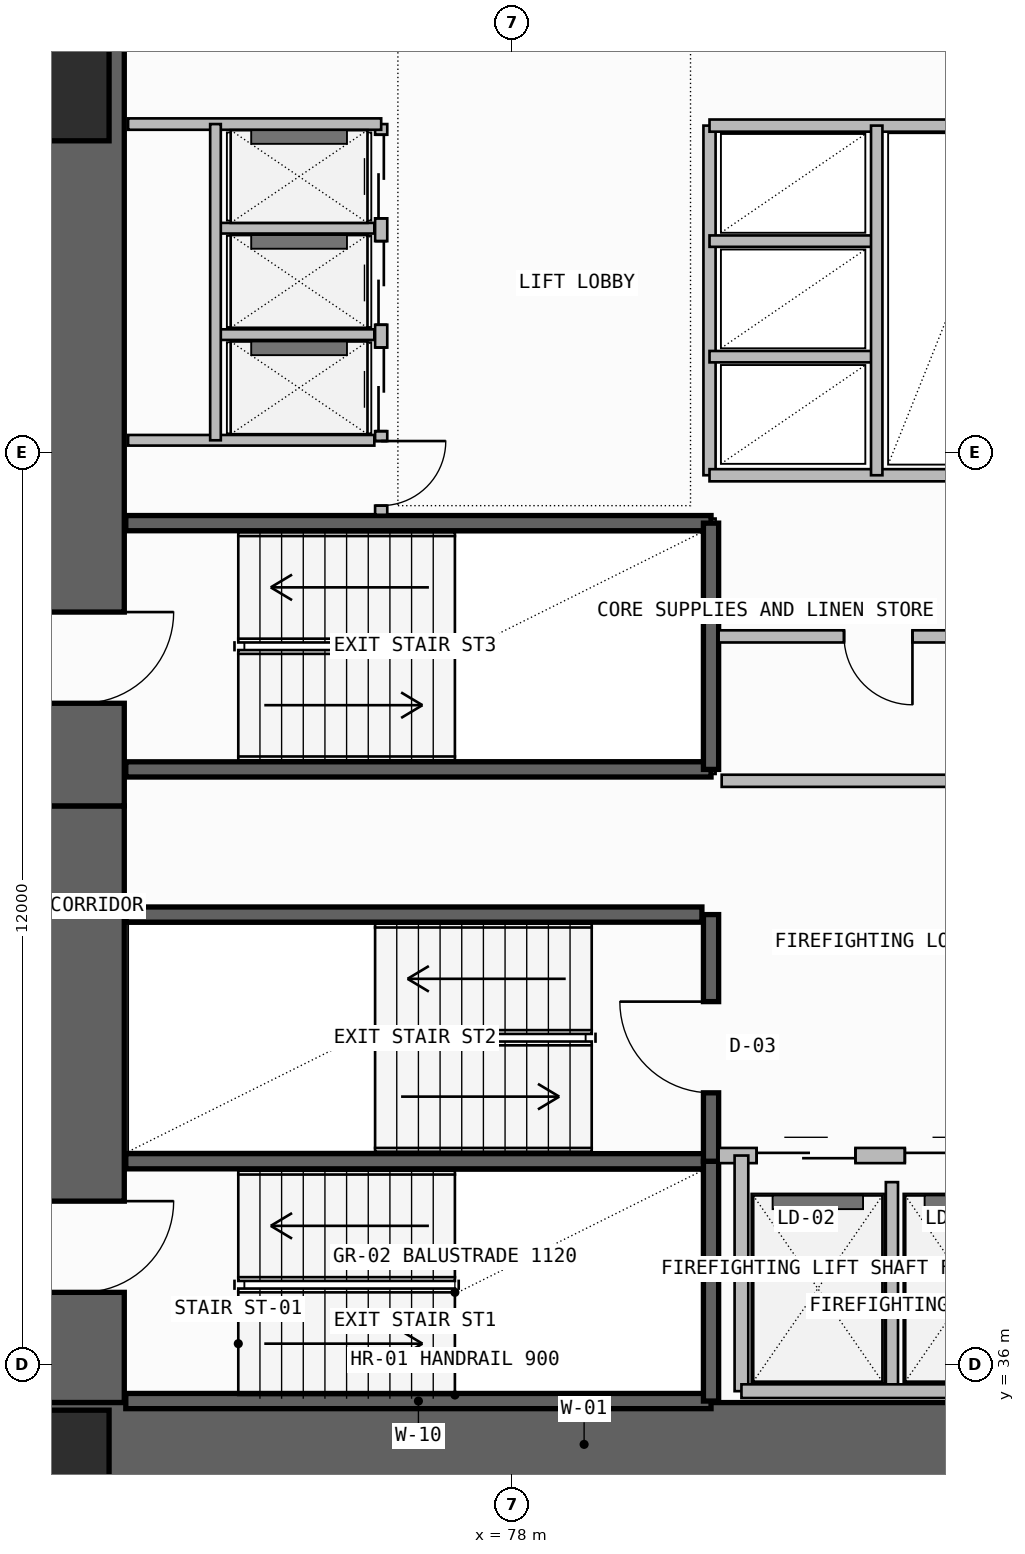
"""IFC4 building model, lengths in metres.
Left out: names, types, materials, properties, quantities, classifications, styles, units other than length and angle.
Written with IfcOpenShell. Run it as: python <this file> out.ifc"""

import sys

from ifc_helpers import new_model, si_unit, direction, frame, frame_2d, origin, origin_2d, place, context, subcontext, project, spatial, rectangle, extrude, element, fill, save


model = new_model("IFC4")
c1 = context("Model", 3, precision=1e-05, world=origin(), true_north=direction((0.0, 1.0)))
c2 = subcontext(c1, "Body", "Model", "MODEL_VIEW")
j1 = project(units=[si_unit("LENGTHUNIT", "METRE"), si_unit("PLANEANGLEUNIT", "RADIAN")], contexts=[c1])
p1 = place(None, origin())
s1 = spatial("IfcSite", under=j1, at=p1, CompositionType="ELEMENT")
p2 = place(p1, origin())
s2 = spatial("IfcBuilding", under=s1, at=p2, CompositionType="ELEMENT")
p3 = place(p2, frame((0.0, 0.0, 70.5)))
s3 = spatial("IfcBuildingStorey", under=s2, at=p3, CompositionType="ELEMENT", Elevation=70.5)
p4 = place(p3, frame((72.35, 35.5, -0.26), z_axis=(0.0, 0.0, 1.0), x_axis=(0.0, 1.0, 0.0)))
e1 = element("IfcWall", 1, at=p4, inside=s3, PredefinedType="SHEAR", context=c2, shape_type="SweptSolid", body=[
    extrude(rectangle(XDim=7.85, YDim=1.1, at=frame_2d((3.925, 0.0))), origin(), (0.0, 0.0, 1.0), 3.6),
])
p5 = place(p4, frame((1.45, 0.0, 0.26)))
e2 = element("IfcOpeningElement", 2, at=p5, cuts=e1, PredefinedType="OPENING", context=c2, shape_type="SweptSolid", body=[
    extrude(rectangle(XDim=1.2, YDim=2.2, at=frame_2d((0.6, 1.1))), frame((0.0, 0.56, 0.0), z_axis=(0.0, -1.0, 0.0), x_axis=(1.0, 0.0, 0.0)), (0.0, 0.0, 1.0), 1.12),
])
p6 = place(p3, frame((71.8, 34.95, -0.26), z_axis=(0.0, 0.0, 1.0), x_axis=(1.0, 0.0, 0.0)))
e3 = element("IfcWall", 3, at=p6, inside=s3, PredefinedType="SHEAR", context=c2, shape_type="SweptSolid", body=[
    extrude(rectangle(XDim=14.3, YDim=1.1, at=frame_2d((7.15, 0.0))), origin(), (0.0, 0.0, 1.0), 3.6),
])
p7 = place(p3, frame((72.35, 43.35, -0.26), z_axis=(0.0, 0.0, 1.0), x_axis=(0.0, 1.0, 0.0)))
e4 = element("IfcWall", 4, at=p7, inside=s3, PredefinedType="SHEAR", context=c2, shape_type="SweptSolid", body=[
    extrude(rectangle(XDim=12.7, YDim=1.1, at=frame_2d((6.35, 0.0))), origin(), (0.0, 0.0, 1.0), 3.6),
])
p8 = place(p7, frame((1.35, 0.0, 0.26)))
e5 = element("IfcOpeningElement", 5, at=p8, cuts=e4, PredefinedType="OPENING", context=c2, shape_type="SweptSolid", body=[
    extrude(rectangle(XDim=1.2, YDim=2.2, at=frame_2d((0.6, 1.1))), frame((0.0, 0.56, 0.0), z_axis=(0.0, -1.0, 0.0), x_axis=(1.0, 0.0, 0.0)), (0.0, 0.0, 1.0), 1.12),
])
for number, where, z_axis, x_axis in (
    (6, (72.0, 34.7, 0.0), (0.0, 0.0, 1.0), (1.0, 0.0, 0.0)),
    (7, (72.0, 52.8, 0.0), (0.0, 0.0, 1.0), (1.0, 0.0, 0.0)),
):
    element("IfcColumn", number, at=place(p3, frame(where, z_axis=z_axis, x_axis=x_axis)), inside=s3, PredefinedType="COLUMN", context=c2, shape_type="SweptSolid", body=[
        extrude(rectangle(XDim=1.4, YDim=1.4, at=origin_2d()), origin(), (0.0, 0.0, 1.0), 3.6),
    ])
for number, where, z_axis, x_axis in (
    (8, (72.92, 35.52, -0.26), (0.0, 0.0, 1.0), (1.0, 0.0, 0.0)),
    (9, (72.92, 38.675, -0.26), (0.0, 0.0, 1.0), (1.0, 0.0, 0.0)),
):
    element("IfcWall", number, at=place(p3, frame(where, z_axis=z_axis, x_axis=x_axis)), inside=s3, PredefinedType="SOLIDWALL", context=c2, shape_type="SweptSolid", body=[
        extrude(rectangle(XDim=7.7, YDim=0.2, at=frame_2d((3.85, 0.0))), origin(), (0.0, 0.0, 1.0), 3.6),
    ])
p9 = place(p3, frame((80.62, 35.52, -0.26), z_axis=(0.0, 0.0, 1.0), x_axis=(0.0, 1.0, 0.0)))
e10 = element("IfcWall", 10, at=p9, inside=s3, PredefinedType="SOLIDWALL", context=c2, shape_type="SweptSolid", body=[
    extrude(rectangle(XDim=3.155, YDim=0.2, at=frame_2d((1.578, 0.0))), origin(), (0.0, 0.0, 1.0), 3.6),
])
p10 = place(p3, frame((80.62, 38.675, -0.26), z_axis=(0.0, 0.0, 1.0), x_axis=(0.0, 1.0, 0.0)))
e11 = element("IfcWall", 11, at=p10, inside=s3, PredefinedType="SOLIDWALL", context=c2, shape_type="SweptSolid", body=[
    extrude(rectangle(XDim=3.245, YDim=0.2, at=frame_2d((1.623, 0.0))), origin(), (0.0, 0.0, 1.0), 3.6),
])
p11 = place(p10, frame((0.9, 0.0, 0.26)))
e12 = element("IfcOpeningElement", 12, at=p11, cuts=e11, PredefinedType="OPENING", context=c2, shape_type="SweptSolid", body=[
    extrude(rectangle(XDim=1.2, YDim=2.2, at=frame_2d((0.6, 1.1))), frame((0.0, 0.11, 0.0), z_axis=(0.0, -1.0, 0.0), x_axis=(1.0, 0.0, 0.0)), (0.0, 0.0, 1.0), 0.22),
])
p12 = place(p3, frame((80.72, 38.75, 0.0), z_axis=(0.0, 0.0, 1.0), x_axis=(1.0, 0.0, 0.0)))
e13 = element("IfcWall", 13, at=p12, inside=s3, PredefinedType="SOLIDWALL", context=c2, shape_type="SweptSolid", body=[
    extrude(rectangle(XDim=4.26, YDim=0.2, at=frame_2d((2.13, 0.0))), origin(), (0.0, 0.0, 1.0), 3.34),
])
p13 = place(p12, frame((0.5, 0.0, 0.0)))
e14 = element("IfcOpeningElement", 14, at=p13, cuts=e13, PredefinedType="OPENING", context=c2, shape_type="SweptSolid", body=[
    extrude(rectangle(XDim=1.3, YDim=2.3, at=frame_2d((0.65, 1.15))), frame((0.0, 0.11, 0.0), z_axis=(0.0, -1.0, 0.0), x_axis=(1.0, 0.0, 0.0)), (0.0, 0.0, 1.0), 0.22),
])
p14 = place(p12, frame((2.45, 0.0, 0.0)))
e15 = element("IfcOpeningElement", 15, at=p14, cuts=e13, PredefinedType="OPENING", context=c2, shape_type="SweptSolid", body=[
    extrude(rectangle(XDim=1.3, YDim=2.3, at=frame_2d((0.65, 1.15))), frame((0.0, 0.11, 0.0), z_axis=(0.0, -1.0, 0.0), x_axis=(1.0, 0.0, 0.0)), (0.0, 0.0, 1.0), 0.22),
])
p15 = place(p3, frame((83.0, 35.65, 0.0), z_axis=(0.0, 0.0, 1.0), x_axis=(0.0, 1.0, 0.0)))
e16 = element("IfcWall", 16, at=p15, inside=s3, PredefinedType="PLUMBINGWALL", context=c2, shape_type="SweptSolid", body=[
    extrude(rectangle(XDim=2.75, YDim=0.16, at=frame_2d((1.375, 0.0))), origin(), (0.0, 0.0, 1.0), 3.34),
])
p16 = place(p3, frame((81.02, 35.65, 0.0), z_axis=(0.0, 0.0, 1.0), x_axis=(0.0, 1.0, 0.0)))
e17 = element("IfcWall", 17, at=p16, inside=s3, PredefinedType="SOLIDWALL", context=c2, shape_type="SweptSolid", body=[
    extrude(rectangle(XDim=3.1, YDim=0.18, at=frame_2d((1.55, 0.0))), origin(), (0.0, 0.0, 1.0), 3.34),
])
p17 = place(p3, frame((81.02, 35.65, 0.0), z_axis=(0.0, 0.0, 1.0), x_axis=(1.0, 0.0, 0.0)))
e18 = element("IfcWall", 18, at=p17, inside=s3, PredefinedType="SOLIDWALL", context=c2, shape_type="SweptSolid", body=[
    extrude(rectangle(XDim=3.93, YDim=0.18, at=frame_2d((1.965, 0.0))), origin(), (0.0, 0.0, 1.0), 3.34),
])
p18 = place(p3, frame((72.92, 41.92, -0.26), z_axis=(0.0, 0.0, 1.0), x_axis=(1.0, 0.0, 0.0)))
e19 = element("IfcWall", 19, at=p18, inside=s3, PredefinedType="SOLIDWALL", context=c2, shape_type="SweptSolid", body=[
    extrude(rectangle(XDim=7.58, YDim=0.2, at=frame_2d((3.79, 0.0))), origin(), (0.0, 0.0, 1.0), 3.6),
])
for number, where, z_axis, x_axis in (
    (20, (72.92, 43.83, -0.26), (0.0, 0.0, 1.0), (1.0, 0.0, 0.0)),
    (21, (72.92, 47.07, -0.26), (0.0, 0.0, 1.0), (1.0, 0.0, 0.0)),
):
    element("IfcWall", number, at=place(p3, frame(where, z_axis=z_axis, x_axis=x_axis)), inside=s3, PredefinedType="SOLIDWALL", context=c2, shape_type="SweptSolid", body=[
        extrude(rectangle(XDim=7.7, YDim=0.2, at=frame_2d((3.85, 0.0))), origin(), (0.0, 0.0, 1.0), 3.6),
    ])
p19 = place(p3, frame((80.62, 43.83, -0.26), z_axis=(0.0, 0.0, 1.0), x_axis=(0.0, 1.0, 0.0)))
e22 = element("IfcWall", 22, at=p19, inside=s3, PredefinedType="SOLIDWALL", context=c2, shape_type="SweptSolid", body=[
    extrude(rectangle(XDim=3.24, YDim=0.2, at=frame_2d((1.62, 0.0))), origin(), (0.0, 0.0, 1.0), 3.6),
])
p20 = place(p3, frame((80.72, 45.58, 0.0), z_axis=(0.0, 0.0, 1.0), x_axis=(1.0, 0.0, 0.0)))
e23 = element("IfcWall", 23, at=p20, inside=s3, PredefinedType="PLUMBINGWALL", context=c2, shape_type="SweptSolid", body=[
    extrude(rectangle(XDim=4.23, YDim=0.16, at=frame_2d((2.115, 0.0))), origin(), (0.0, 0.0, 1.0), 3.34),
])
p21 = place(p20, frame((1.65, 0.0, 0.0)))
e24 = element("IfcOpeningElement", 24, at=p21, cuts=e23, PredefinedType="OPENING", context=c2, shape_type="SweptSolid", body=[
    extrude(rectangle(XDim=0.9, YDim=2.1, at=frame_2d((0.45, 1.05))), frame((0.0, 0.09, 0.0), z_axis=(0.0, -1.0, 0.0), x_axis=(1.0, 0.0, 0.0)), (0.0, 0.0, 1.0), 0.18),
])
p22 = place(p3, frame((80.76, 43.68, 0.0), z_axis=(0.0, 0.0, 1.0), x_axis=(1.0, 0.0, 0.0)))
e25 = element("IfcWall", 25, at=p22, inside=s3, PredefinedType="PLUMBINGWALL", context=c2, shape_type="SweptSolid", body=[
    extrude(rectangle(XDim=4.19, YDim=0.16, at=frame_2d((2.095, 0.0))), origin(), (0.0, 0.0, 1.0), 3.34),
])
p23 = place(p3, frame((76.28, 47.18, 0.0), z_axis=(0.0, 0.0, 1.0), x_axis=(0.0, 1.0, 0.0)))
e26 = element("IfcWall", 26, at=p23, inside=s3, PredefinedType="SOLIDWALL", context=c2, shape_type="SweptSolid", body=[
    extrude(rectangle(XDim=5.14, YDim=0.16, at=frame_2d((2.57, 0.0))), origin(), (0.0, 0.0, 1.0), 3.34),
])
p24 = place(p23, frame((1.1, 0.0, 0.0)))
e27 = element("IfcOpeningElement", 27, at=p24, cuts=e26, PredefinedType="OPENING", context=c2, shape_type="SweptSolid", body=[
    extrude(rectangle(XDim=1.1, YDim=2.25, at=frame_2d((0.55, 1.125))), frame((0.0, 0.09, 0.0), z_axis=(0.0, -1.0, 0.0), x_axis=(1.0, 0.0, 0.0)), (0.0, 0.0, 1.0), 0.18),
])
p25 = place(p23, frame((2.5, 0.0, 0.0)))
e28 = element("IfcOpeningElement", 28, at=p25, cuts=e26, PredefinedType="OPENING", context=c2, shape_type="SweptSolid", body=[
    extrude(rectangle(XDim=1.1, YDim=2.25, at=frame_2d((0.55, 1.125))), frame((0.0, 0.09, 0.0), z_axis=(0.0, -1.0, 0.0), x_axis=(1.0, 0.0, 0.0)), (0.0, 0.0, 1.0), 0.18),
])
p26 = place(p23, frame((3.9, 0.0, 0.0)))
e29 = element("IfcOpeningElement", 29, at=p26, cuts=e26, PredefinedType="OPENING", context=c2, shape_type="SweptSolid", body=[
    extrude(rectangle(XDim=1.1, YDim=2.25, at=frame_2d((0.55, 1.125))), frame((0.0, 0.09, 0.0), z_axis=(0.0, -1.0, 0.0), x_axis=(1.0, 0.0, 0.0)), (0.0, 0.0, 1.0), 0.18),
])
p27 = place(p23, frame((0.12, 0.0, 0.0)))
e30 = element("IfcOpeningElement", 30, at=p27, cuts=e26, PredefinedType="OPENING", context=c2, shape_type="SweptSolid", body=[
    extrude(rectangle(XDim=0.85, YDim=2.05, at=frame_2d((0.425, 1.025))), frame((0.0, 0.09, 0.0), z_axis=(0.0, -1.0, 0.0), x_axis=(1.0, 0.0, 0.0)), (0.0, 0.0, 1.0), 0.18),
])
p28 = place(p3, frame((72.95, 52.32, 0.0), z_axis=(0.0, 0.0, 1.0), x_axis=(1.0, 0.0, 0.0)))
e31 = element("IfcWall", 31, at=p28, inside=s3, PredefinedType="SOLIDWALL", context=c2, shape_type="SweptSolid", body=[
    extrude(rectangle(XDim=3.33, YDim=0.15, at=frame_2d((1.665, 0.0))), origin(), (0.0, 0.0, 1.0), 3.34),
])
p29 = place(p3, frame((72.95, 48.16, 0.0), z_axis=(0.0, 0.0, 1.0), x_axis=(1.0, 0.0, 0.0)))
e32 = element("IfcWall", 32, at=p29, inside=s3, PredefinedType="PLUMBINGWALL", context=c2, shape_type="SweptSolid", body=[
    extrude(rectangle(XDim=3.24, YDim=0.14, at=frame_2d((1.62, 0.0))), origin(), (0.0, 0.0, 1.0), 3.34),
])
for number, where, z_axis, x_axis in (
    (33, (74.15, 49.55, 0.0), (0.0, 0.0, 1.0), (1.0, 0.0, 0.0)),
    (34, (74.15, 50.95, 0.0), (0.0, 0.0, 1.0), (1.0, 0.0, 0.0)),
):
    element("IfcWall", number, at=place(p3, frame(where, z_axis=z_axis, x_axis=x_axis)), inside=s3, PredefinedType="PLUMBINGWALL", context=c2, shape_type="SweptSolid", body=[
        extrude(rectangle(XDim=2.04, YDim=0.14, at=frame_2d((1.02, 0.0))), origin(), (0.0, 0.0, 1.0), 3.34),
    ])
p30 = place(p3, frame((74.1, 48.16, 0.0), z_axis=(0.0, 0.0, 1.0), x_axis=(0.0, 1.0, 0.0)))
e35 = element("IfcWall", 35, at=p30, inside=s3, PredefinedType="PLUMBINGWALL", context=c2, shape_type="SweptSolid", body=[
    extrude(rectangle(XDim=4.16, YDim=0.14, at=frame_2d((2.08, 0.0))), origin(), (0.0, 0.0, 1.0), 3.34),
])
p31 = place(p3, frame((80.6, 47.7, 0.0), z_axis=(0.0, 0.0, 1.0), x_axis=(0.0, 1.0, 0.0)))
e36 = element("IfcWall", 36, at=p31, inside=s3, PredefinedType="SOLIDWALL", context=c2, shape_type="SweptSolid", body=[
    extrude(rectangle(XDim=4.6, YDim=0.16, at=frame_2d((2.3, 0.0))), origin(), (0.0, 0.0, 1.0), 3.34),
])
p32 = place(p3, frame((80.6, 47.7, 0.0), z_axis=(0.0, 0.0, 1.0), x_axis=(1.0, 0.0, 0.0)))
e37 = element("IfcWall", 37, at=p32, inside=s3, PredefinedType="SOLIDWALL", context=c2, shape_type="SweptSolid", body=[
    extrude(rectangle(XDim=4.4, YDim=0.16, at=frame_2d((2.2, 0.0))), origin(), (0.0, 0.0, 1.0), 3.34),
])
p33 = place(p3, frame((80.6, 52.3, 0.0), z_axis=(0.0, 0.0, 1.0), x_axis=(1.0, 0.0, 0.0)))
e38 = element("IfcWall", 38, at=p33, inside=s3, PredefinedType="SOLIDWALL", context=c2, shape_type="SweptSolid", body=[
    extrude(rectangle(XDim=4.22, YDim=0.16, at=frame_2d((2.11, 0.0))), origin(), (0.0, 0.0, 1.0), 3.34),
])
for number, where, z_axis, x_axis in (
    (39, (80.6, 49.26, 0.0), (0.0, 0.0, 1.0), (1.0, 0.0, 0.0)),
    (40, (80.6, 50.78, 0.0), (0.0, 0.0, 1.0), (1.0, 0.0, 0.0)),
):
    element("IfcWall", number, at=place(p3, frame(where, z_axis=z_axis, x_axis=x_axis)), inside=s3, PredefinedType="PLUMBINGWALL", context=c2, shape_type="SweptSolid", body=[
        extrude(rectangle(XDim=2.2, YDim=0.15, at=frame_2d((1.1, 0.0))), origin(), (0.0, 0.0, 1.0), 3.34),
    ])
p34 = place(p3, frame((82.8, 47.7, 0.0), z_axis=(0.0, 0.0, 1.0), x_axis=(0.0, 1.0, 0.0)))
e41 = element("IfcWall", 41, at=p34, inside=s3, PredefinedType="PLUMBINGWALL", context=c2, shape_type="SweptSolid", body=[
    extrude(rectangle(XDim=4.6, YDim=0.15, at=frame_2d((2.3, 0.0))), origin(), (0.0, 0.0, 1.0), 3.34),
])
p35 = place(p5, frame((1.2, 0.0, 0.0), z_axis=(0.0, 0.0, 1.0), x_axis=(-1.0, 0.0, 0.0)))
e42 = element("IfcDoor", 42, at=p35, inside=s3, OperationType="SINGLE_SWING_LEFT", PredefinedType="USERDEFINED", context=c2, shape_type="SweptSolid", body=[
    extrude(rectangle(XDim=1.2, YDim=2.2, at=frame_2d((0.6, 1.1))), frame((0.0, 0.025, 0.0), z_axis=(0.0, -1.0, 0.0), x_axis=(1.0, 0.0, 0.0)), (0.0, 0.0, 1.0), 0.05),
])
fill(e2, e42)
p36 = place(p11, origin())
e43 = element("IfcDoor", 43, at=p36, inside=s3, OperationType="SINGLE_SWING_RIGHT", PredefinedType="USERDEFINED", context=c2, shape_type="SweptSolid", body=[
    extrude(rectangle(XDim=1.2, YDim=2.2, at=frame_2d((0.6, 1.1))), frame((0.0, 0.025, 0.0), z_axis=(0.0, -1.0, 0.0), x_axis=(1.0, 0.0, 0.0)), (0.0, 0.0, 1.0), 0.05),
])
fill(e12, e43)
p37 = place(p13, origin())
e44 = element("IfcDoor", 44, at=p37, inside=s3, OperationType="DOUBLE_DOOR_SLIDING", PredefinedType="DOOR", context=c2, shape_type="SweptSolid", body=[
    extrude(rectangle(XDim=1.3, YDim=2.3, at=frame_2d((0.65, 1.15))), frame((0.0, 0.025, 0.0), z_axis=(0.0, -1.0, 0.0), x_axis=(1.0, 0.0, 0.0)), (0.0, 0.0, 1.0), 0.05),
])
fill(e14, e44)
p38 = place(p14, origin())
e45 = element("IfcDoor", 45, at=p38, inside=s3, OperationType="DOUBLE_DOOR_SLIDING", PredefinedType="DOOR", context=c2, shape_type="SweptSolid", body=[
    extrude(rectangle(XDim=1.3, YDim=2.3, at=frame_2d((0.65, 1.15))), frame((0.0, 0.025, 0.0), z_axis=(0.0, -1.0, 0.0), x_axis=(1.0, 0.0, 0.0)), (0.0, 0.0, 1.0), 0.05),
])
fill(e15, e45)
p39 = place(p8, frame((1.2, 0.0, 0.0), z_axis=(0.0, 0.0, 1.0), x_axis=(-1.0, 0.0, 0.0)))
e46 = element("IfcDoor", 46, at=p39, inside=s3, OperationType="SINGLE_SWING_LEFT", PredefinedType="USERDEFINED", context=c2, shape_type="SweptSolid", body=[
    extrude(rectangle(XDim=1.2, YDim=2.2, at=frame_2d((0.6, 1.1))), frame((0.0, 0.025, 0.0), z_axis=(0.0, -1.0, 0.0), x_axis=(1.0, 0.0, 0.0)), (0.0, 0.0, 1.0), 0.05),
])
fill(e5, e46)
p40 = place(p21, frame((0.9, 0.0, 0.0), z_axis=(0.0, 0.0, 1.0), x_axis=(-1.0, 0.0, 0.0)))
e47 = element("IfcDoor", 47, at=p40, inside=s3, OperationType="SINGLE_SWING_LEFT", PredefinedType="DOOR", context=c2, shape_type="SweptSolid", body=[
    extrude(rectangle(XDim=0.9, YDim=2.1, at=frame_2d((0.45, 1.05))), frame((0.0, 0.025, 0.0), z_axis=(0.0, -1.0, 0.0), x_axis=(1.0, 0.0, 0.0)), (0.0, 0.0, 1.0), 0.05),
])
fill(e24, e47)
p41 = place(p24, origin())
e48 = element("IfcDoor", 48, at=p41, inside=s3, OperationType="DOUBLE_DOOR_SLIDING", PredefinedType="DOOR", context=c2, shape_type="SweptSolid", body=[
    extrude(rectangle(XDim=1.1, YDim=2.25, at=frame_2d((0.55, 1.125))), frame((0.0, 0.025, 0.0), z_axis=(0.0, -1.0, 0.0), x_axis=(1.0, 0.0, 0.0)), (0.0, 0.0, 1.0), 0.05),
])
fill(e27, e48)
p42 = place(p25, origin())
e49 = element("IfcDoor", 49, at=p42, inside=s3, OperationType="DOUBLE_DOOR_SLIDING", PredefinedType="DOOR", context=c2, shape_type="SweptSolid", body=[
    extrude(rectangle(XDim=1.1, YDim=2.25, at=frame_2d((0.55, 1.125))), frame((0.0, 0.025, 0.0), z_axis=(0.0, -1.0, 0.0), x_axis=(1.0, 0.0, 0.0)), (0.0, 0.0, 1.0), 0.05),
])
fill(e28, e49)
p43 = place(p26, origin())
e50 = element("IfcDoor", 50, at=p43, inside=s3, OperationType="DOUBLE_DOOR_SLIDING", PredefinedType="DOOR", context=c2, shape_type="SweptSolid", body=[
    extrude(rectangle(XDim=1.1, YDim=2.25, at=frame_2d((0.55, 1.125))), frame((0.0, 0.025, 0.0), z_axis=(0.0, -1.0, 0.0), x_axis=(1.0, 0.0, 0.0)), (0.0, 0.0, 1.0), 0.05),
])
fill(e29, e50)
p44 = place(p27, frame((0.85, 0.0, 0.0), z_axis=(0.0, 0.0, 1.0), x_axis=(-1.0, 0.0, 0.0)))
e51 = element("IfcDoor", 51, at=p44, inside=s3, OperationType="SINGLE_SWING_LEFT", PredefinedType="DOOR", context=c2, shape_type="SweptSolid", body=[
    extrude(rectangle(XDim=0.85, YDim=2.05, at=frame_2d((0.425, 1.025))), frame((0.0, 0.025, 0.0), z_axis=(0.0, -1.0, 0.0), x_axis=(1.0, 0.0, 0.0)), (0.0, 0.0, 1.0), 0.05),
])
fill(e30, e51)
save(model, sys.argv[1])
